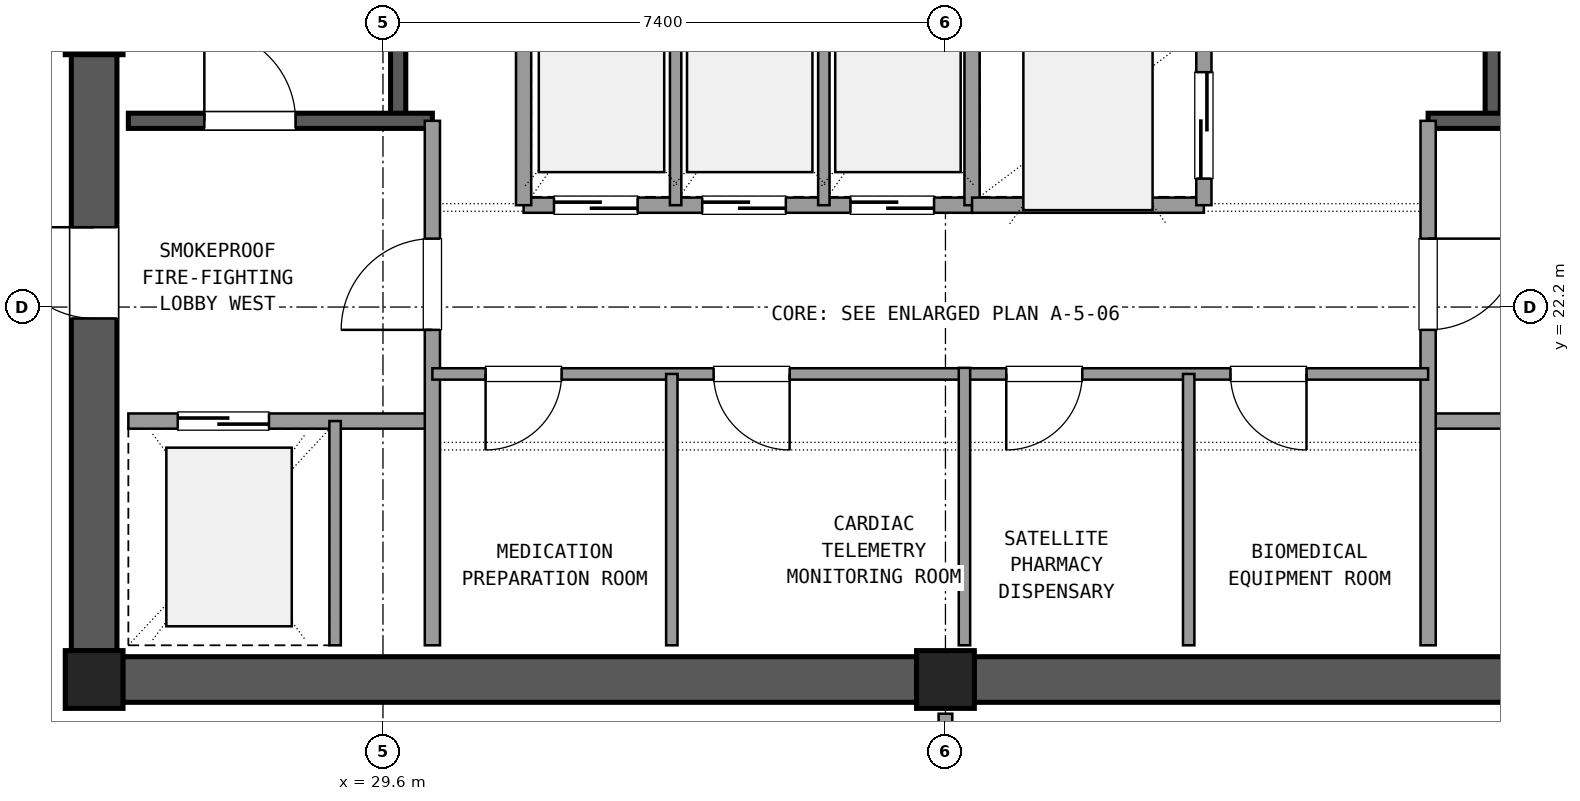
"""IFC4 building model, lengths in metres.
Left out: names, types, materials, properties, quantities, classifications, styles, units other than length and angle.
Written with IfcOpenShell. Run it as: python <this file> out.ifc"""

import sys

from ifc_helpers import new_model, si_unit, direction, frame, frame_2d, origin, origin_2d, place, context, subcontext, project, spatial, rectangle, extrude, element, fill, save


model = new_model("IFC4")
c1 = context("Model", 3, precision=1e-05, world=origin(), true_north=direction((0.0, 1.0)))
c2 = subcontext(c1, "Body", "Model", "MODEL_VIEW")
j1 = project(units=[si_unit("LENGTHUNIT", "METRE"), si_unit("PLANEANGLEUNIT", "RADIAN")], contexts=[c1])
p1 = place(None, origin())
s1 = spatial("IfcSite", under=j1, at=p1, CompositionType="ELEMENT")
p2 = place(p1, origin())
s2 = spatial("IfcBuilding", under=s1, at=p2, CompositionType="ELEMENT")
p3 = place(p2, frame((0.0, 0.0, 264.42)))
s3 = spatial("IfcBuildingStorey", under=s2, at=p3, CompositionType="ELEMENT", Elevation=264.42)
for number, where, z_axis, x_axis in (
    (1, (25.8, 17.3, 0.0), (0.0, 0.0, 1.0), (1.0, 0.0, 0.0)),
    (2, (37.0, 17.3, 0.0), (0.0, 0.0, 1.0), (1.0, 0.0, 0.0)),
    (3, (25.8, 25.9, 0.0), (0.0, 0.0, 1.0), (1.0, 0.0, 0.0)),
):
    element("IfcColumn", number, at=place(p3, frame(where, z_axis=z_axis, x_axis=x_axis)), inside=s3, PredefinedType="COLUMN", context=c2, shape_type="SweptSolid", body=[
        extrude(rectangle(XDim=0.76, YDim=0.76, at=origin_2d()), origin(), (0.0, 0.0, 1.0), 3.6),
    ])
for number, where, z_axis, x_axis in (
    (4, (26.175, 17.3, 0.0), (0.0, 0.0, 1.0), (1.0, 0.0, 0.0)),
    (5, (37.375, 17.3, 0.0), (0.0, 0.0, 1.0), (1.0, 0.0, 0.0)),
):
    element("IfcWall", number, at=place(p3, frame(where, z_axis=z_axis, x_axis=x_axis)), inside=s3, PredefinedType="SHEAR", context=c2, shape_type="SweptSolid", body=[
        extrude(rectangle(XDim=10.45, YDim=0.6, at=frame_2d((5.225, 0.0))), origin(), (0.0, 0.0, 1.0), 3.32),
    ])
p4 = place(p3, frame((25.8, 25.525, 0.0), z_axis=(0.0, 0.0, 1.0), x_axis=(0.0, -1.0, 0.0)))
e6 = element("IfcWall", 6, at=p4, inside=s3, PredefinedType="SHEAR", context=c2, shape_type="SweptSolid", body=[
    extrude(rectangle(XDim=7.85, YDim=0.6, at=frame_2d((3.925, 0.0))), origin(), (0.0, 0.0, 1.0), 3.32),
])
p5 = place(p4, frame((2.275, 0.0, 0.0)))
e7 = element("IfcOpeningElement", 7, at=p5, cuts=e6, PredefinedType="OPENING", context=c2, shape_type="SweptSolid", body=[
    extrude(rectangle(XDim=1.2, YDim=2.15, at=frame_2d((0.6, 1.075))), frame((0.0, 0.31, 0.0), z_axis=(0.0, -1.0, 0.0), x_axis=(1.0, 0.0, 0.0)), (0.0, 0.0, 1.0), 0.62),
])
p6 = place(p3, frame((29.8, 24.65, 0.0), z_axis=(0.0, 0.0, 1.0), x_axis=(0.0, 1.0, 0.0)))
e8 = element("IfcWall", 8, at=p6, inside=s3, PredefinedType="SHEAR", context=c2, shape_type="SweptSolid", body=[
    extrude(rectangle(XDim=9.4, YDim=0.2, at=frame_2d((4.7, 0.0))), origin(), (0.0, 0.0, 1.0), 3.32),
])
p7 = place(p3, frame((26.25, 24.65, 0.0), z_axis=(0.0, 0.0, 1.0), x_axis=(1.0, 0.0, 0.0)))
e9 = element("IfcWall", 9, at=p7, inside=s3, PredefinedType="SHEAR", context=c2, shape_type="SweptSolid", body=[
    extrude(rectangle(XDim=4.0, YDim=0.2, at=frame_2d((2.0, 0.0))), origin(), (0.0, 0.0, 1.0), 3.32),
])
p8 = place(p7, frame((1.0, 0.0, 0.0)))
e10 = element("IfcOpeningElement", 10, at=p8, cuts=e9, PredefinedType="OPENING", context=c2, shape_type="SweptSolid", body=[
    extrude(rectangle(XDim=1.2, YDim=2.15, at=frame_2d((0.6, 1.075))), frame((0.0, 0.11, 0.0), z_axis=(0.0, -1.0, 0.0), x_axis=(1.0, 0.0, 0.0)), (0.0, 0.0, 1.0), 0.22),
])
p9 = place(p3, frame((44.2, 24.65, 0.0), z_axis=(0.0, 0.0, 1.0), x_axis=(0.0, 1.0, 0.0)))
e11 = element("IfcWall", 11, at=p9, inside=s3, PredefinedType="SHEAR", context=c2, shape_type="SweptSolid", body=[
    extrude(rectangle(XDim=9.4, YDim=0.2, at=frame_2d((4.7, 0.0))), origin(), (0.0, 0.0, 1.0), 3.32),
])
p10 = place(p3, frame((43.35, 24.65, 0.0), z_axis=(0.0, 0.0, 1.0), x_axis=(1.0, 0.0, 0.0)))
e12 = element("IfcWall", 12, at=p10, inside=s3, PredefinedType="SHEAR", context=c2, shape_type="SweptSolid", body=[
    extrude(rectangle(XDim=4.4, YDim=0.2, at=frame_2d((2.2, 0.0))), origin(), (0.0, 0.0, 1.0), 3.32),
])
p11 = place(p10, frame((2.0, 0.0, 0.0)))
e13 = element("IfcOpeningElement", 13, at=p11, cuts=e12, PredefinedType="OPENING", context=c2, shape_type="SweptSolid", body=[
    extrude(rectangle(XDim=1.2, YDim=2.15, at=frame_2d((0.6, 1.075))), frame((0.0, 0.11, 0.0), z_axis=(0.0, -1.0, 0.0), x_axis=(1.0, 0.0, 0.0)), (0.0, 0.0, 1.0), 0.22),
])
p12 = place(p3, frame((26.25, 20.7, 0.0), z_axis=(0.0, 0.0, 1.0), x_axis=(1.0, 0.0, 0.0)))
e14 = element("IfcWall", 14, at=p12, inside=s3, PredefinedType="SOLIDWALL", context=c2, shape_type="SweptSolid", body=[
    extrude(rectangle(XDim=4.0, YDim=0.2, at=frame_2d((2.0, 0.0))), origin(), (0.0, 0.0, 1.0), 2.61),
])
p13 = place(p12, frame((0.65, 0.0, 0.0)))
e15 = element("IfcOpeningElement", 15, at=p13, cuts=e14, PredefinedType="OPENING", context=c2, shape_type="SweptSolid", body=[
    extrude(rectangle(XDim=1.2, YDim=2.15, at=frame_2d((0.6, 1.075))), frame((0.0, 0.11, 0.0), z_axis=(0.0, -1.0, 0.0), x_axis=(1.0, 0.0, 0.0)), (0.0, 0.0, 1.0), 0.22),
])
p14 = place(p3, frame((30.25, 17.75, 0.0), z_axis=(0.0, 0.0, 1.0), x_axis=(0.0, 1.0, 0.0)))
e16 = element("IfcWall", 16, at=p14, inside=s3, PredefinedType="SOLIDWALL", context=c2, shape_type="SweptSolid", body=[
    extrude(rectangle(XDim=6.9, YDim=0.2, at=frame_2d((3.45, 0.0))), origin(), (0.0, 0.0, 1.0), 2.61),
])
p15 = place(p14, frame((4.15, 0.0, 0.0)))
e17 = element("IfcOpeningElement", 17, at=p15, cuts=e16, PredefinedType="OPENING", context=c2, shape_type="SweptSolid", body=[
    extrude(rectangle(XDim=1.2, YDim=2.15, at=frame_2d((0.6, 1.075))), frame((0.0, 0.11, 0.0), z_axis=(0.0, -1.0, 0.0), x_axis=(1.0, 0.0, 0.0)), (0.0, 0.0, 1.0), 0.22),
])
p16 = place(p3, frame((28.97, 17.75, 0.0), z_axis=(0.0, 0.0, 1.0), x_axis=(0.0, 1.0, 0.0)))
e18 = element("IfcWall", 18, at=p16, inside=s3, PredefinedType="PARTITIONING", context=c2, shape_type="SweptSolid", body=[
    extrude(rectangle(XDim=2.95, YDim=0.15, at=frame_2d((1.475, 0.0))), origin(), (0.0, 0.0, 1.0), 2.61),
])
p17 = place(p3, frame((43.35, 20.7, 0.0), z_axis=(0.0, 0.0, 1.0), x_axis=(1.0, 0.0, 0.0)))
e19 = element("IfcWall", 19, at=p17, inside=s3, PredefinedType="SOLIDWALL", context=c2, shape_type="SweptSolid", body=[
    extrude(rectangle(XDim=4.4, YDim=0.2, at=frame_2d((2.2, 0.0))), origin(), (0.0, 0.0, 1.0), 2.61),
])
p18 = place(p17, frame((2.35, 0.0, 0.0)))
e20 = element("IfcOpeningElement", 20, at=p18, cuts=e19, PredefinedType="OPENING", context=c2, shape_type="SweptSolid", body=[
    extrude(rectangle(XDim=1.2, YDim=2.15, at=frame_2d((0.6, 1.075))), frame((0.0, 0.11, 0.0), z_axis=(0.0, -1.0, 0.0), x_axis=(1.0, 0.0, 0.0)), (0.0, 0.0, 1.0), 0.22),
])
p19 = place(p3, frame((43.35, 17.75, 0.0), z_axis=(0.0, 0.0, 1.0), x_axis=(0.0, 1.0, 0.0)))
e21 = element("IfcWall", 21, at=p19, inside=s3, PredefinedType="SOLIDWALL", context=c2, shape_type="SweptSolid", body=[
    extrude(rectangle(XDim=6.9, YDim=0.2, at=frame_2d((3.45, 0.0))), origin(), (0.0, 0.0, 1.0), 2.61),
])
p20 = place(p19, frame((4.15, 0.0, 0.0)))
e22 = element("IfcOpeningElement", 22, at=p20, cuts=e21, PredefinedType="OPENING", context=c2, shape_type="SweptSolid", body=[
    extrude(rectangle(XDim=1.2, YDim=2.15, at=frame_2d((0.6, 1.075))), frame((0.0, 0.11, 0.0), z_axis=(0.0, -1.0, 0.0), x_axis=(1.0, 0.0, 0.0)), (0.0, 0.0, 1.0), 0.22),
])
p21 = place(p3, frame((30.25, 21.32, 0.0), z_axis=(0.0, 0.0, 1.0), x_axis=(1.0, 0.0, 0.0)))
e23 = element("IfcWall", 23, at=p21, inside=s3, PredefinedType="PARTITIONING", context=c2, shape_type="SweptSolid", body=[
    extrude(rectangle(XDim=7.0, YDim=0.15, at=frame_2d((3.5, 0.0))), origin(), (0.0, 0.0, 1.0), 2.61),
])
p22 = place(p21, frame((0.7, 0.0, 0.0)))
e24 = element("IfcOpeningElement", 24, at=p22, cuts=e23, PredefinedType="OPENING", context=c2, shape_type="SweptSolid", body=[
    extrude(rectangle(XDim=1.0, YDim=2.15, at=frame_2d((0.5, 1.075))), frame((0.0, 0.085, 0.0), z_axis=(0.0, -1.0, 0.0), x_axis=(1.0, 0.0, 0.0)), (0.0, 0.0, 1.0), 0.17),
])
p23 = place(p21, frame((3.7, 0.0, 0.0)))
e25 = element("IfcOpeningElement", 25, at=p23, cuts=e23, PredefinedType="OPENING", context=c2, shape_type="SweptSolid", body=[
    extrude(rectangle(XDim=1.0, YDim=2.15, at=frame_2d((0.5, 1.075))), frame((0.0, 0.085, 0.0), z_axis=(0.0, -1.0, 0.0), x_axis=(1.0, 0.0, 0.0)), (0.0, 0.0, 1.0), 0.17),
])
p24 = place(p3, frame((33.4, 17.75, 0.0), z_axis=(0.0, 0.0, 1.0), x_axis=(0.0, 1.0, 0.0)))
e26 = element("IfcWall", 26, at=p24, inside=s3, PredefinedType="PARTITIONING", context=c2, shape_type="SweptSolid", body=[
    extrude(rectangle(XDim=3.57, YDim=0.15, at=frame_2d((1.785, 0.0))), origin(), (0.0, 0.0, 1.0), 2.61),
])
p25 = place(p3, frame((37.25, 21.32, 0.0), z_axis=(0.0, 0.0, 1.0), x_axis=(1.0, 0.0, 0.0)))
e27 = element("IfcWall", 27, at=p25, inside=s3, PredefinedType="PARTITIONING", context=c2, shape_type="SweptSolid", body=[
    extrude(rectangle(XDim=6.1, YDim=0.15, at=frame_2d((3.05, 0.0))), origin(), (0.0, 0.0, 1.0), 2.61),
])
p26 = place(p25, frame((0.55, 0.0, 0.0)))
e28 = element("IfcOpeningElement", 28, at=p26, cuts=e27, PredefinedType="OPENING", context=c2, shape_type="SweptSolid", body=[
    extrude(rectangle(XDim=1.0, YDim=2.15, at=frame_2d((0.5, 1.075))), frame((0.0, 0.085, 0.0), z_axis=(0.0, -1.0, 0.0), x_axis=(1.0, 0.0, 0.0)), (0.0, 0.0, 1.0), 0.17),
])
p27 = place(p25, frame((3.5, 0.0, 0.0)))
e29 = element("IfcOpeningElement", 29, at=p27, cuts=e27, PredefinedType="OPENING", context=c2, shape_type="SweptSolid", body=[
    extrude(rectangle(XDim=1.0, YDim=2.15, at=frame_2d((0.5, 1.075))), frame((0.0, 0.085, 0.0), z_axis=(0.0, -1.0, 0.0), x_axis=(1.0, 0.0, 0.0)), (0.0, 0.0, 1.0), 0.17),
])
p28 = place(p3, frame((40.2, 17.75, 0.0), z_axis=(0.0, 0.0, 1.0), x_axis=(0.0, 1.0, 0.0)))
e30 = element("IfcWall", 30, at=p28, inside=s3, PredefinedType="PARTITIONING", context=c2, shape_type="SweptSolid", body=[
    extrude(rectangle(XDim=3.57, YDim=0.15, at=frame_2d((1.785, 0.0))), origin(), (0.0, 0.0, 1.0), 2.61),
])
p29 = place(p3, frame((37.25, 17.75, 0.0), z_axis=(0.0, 0.0, 1.0), x_axis=(0.0, 1.0, 0.0)))
e31 = element("IfcWall", 31, at=p29, inside=s3, PredefinedType="PARTITIONING", context=c2, shape_type="SweptSolid", body=[
    extrude(rectangle(XDim=3.65, YDim=0.15, at=frame_2d((1.825, 0.0))), origin(), (0.0, 0.0, 1.0), 2.61),
])
p30 = place(p3, frame((31.45, 23.54, 0.0), z_axis=(0.0, 0.0, 1.0), x_axis=(1.0, 0.0, 0.0)))
e32 = element("IfcWall", 32, at=p30, inside=s3, PredefinedType="SOLIDWALL", context=c2, shape_type="SweptSolid", body=[
    extrude(rectangle(XDim=5.9, YDim=0.2, at=frame_2d((2.95, 0.0))), origin(), (0.0, 0.0, 1.0), 2.61),
])
p31 = place(p30, frame((0.4, 0.0, 0.0)))
e33 = element("IfcOpeningElement", 33, at=p31, cuts=e32, PredefinedType="OPENING", context=c2, shape_type="SweptSolid", body=[
    extrude(rectangle(XDim=1.1, YDim=2.15, at=frame_2d((0.55, 1.075))), frame((0.0, 0.11, 0.0), z_axis=(0.0, -1.0, 0.0), x_axis=(1.0, 0.0, 0.0)), (0.0, 0.0, 1.0), 0.22),
])
p32 = place(p30, frame((2.35, 0.0, 0.0)))
e34 = element("IfcOpeningElement", 34, at=p32, cuts=e32, PredefinedType="OPENING", context=c2, shape_type="SweptSolid", body=[
    extrude(rectangle(XDim=1.1, YDim=2.15, at=frame_2d((0.55, 1.075))), frame((0.0, 0.11, 0.0), z_axis=(0.0, -1.0, 0.0), x_axis=(1.0, 0.0, 0.0)), (0.0, 0.0, 1.0), 0.22),
])
p33 = place(p30, frame((4.3, 0.0, 0.0)))
e35 = element("IfcOpeningElement", 35, at=p33, cuts=e32, PredefinedType="OPENING", context=c2, shape_type="SweptSolid", body=[
    extrude(rectangle(XDim=1.1, YDim=2.15, at=frame_2d((0.55, 1.075))), frame((0.0, 0.11, 0.0), z_axis=(0.0, -1.0, 0.0), x_axis=(1.0, 0.0, 0.0)), (0.0, 0.0, 1.0), 0.22),
])
p34 = place(p3, frame((31.45, 23.54, 0.0), z_axis=(0.0, 0.0, 1.0), x_axis=(0.0, 1.0, 0.0)))
e36 = element("IfcWall", 36, at=p34, inside=s3, PredefinedType="SOLIDWALL", context=c2, shape_type="SweptSolid", body=[
    extrude(rectangle(XDim=2.81, YDim=0.2, at=frame_2d((1.405, 0.0))), origin(), (0.0, 0.0, 1.0), 2.61),
])
for number, where, z_axis, x_axis in (
    (37, (33.45, 23.54, 0.0), (0.0, 0.0, 1.0), (0.0, 1.0, 0.0)),
    (38, (35.4, 23.54, 0.0), (0.0, 0.0, 1.0), (0.0, 1.0, 0.0)),
):
    element("IfcWall", number, at=place(p3, frame(where, z_axis=z_axis, x_axis=x_axis)), inside=s3, PredefinedType="PARTITIONING", context=c2, shape_type="SweptSolid", body=[
        extrude(rectangle(XDim=2.81, YDim=0.15, at=frame_2d((1.405, 0.0))), origin(), (0.0, 0.0, 1.0), 2.61),
    ])
p35 = place(p3, frame((37.35, 23.54, 0.0), z_axis=(0.0, 0.0, 1.0), x_axis=(0.0, 1.0, 0.0)))
e39 = element("IfcWall", 39, at=p35, inside=s3, PredefinedType="SOLIDWALL", context=c2, shape_type="SweptSolid", body=[
    extrude(rectangle(XDim=6.82, YDim=0.2, at=frame_2d((3.41, 0.0))), origin(), (0.0, 0.0, 1.0), 2.61),
])
p36 = place(p3, frame((37.35, 23.54, 0.0), z_axis=(0.0, 0.0, 1.0), x_axis=(1.0, 0.0, 0.0)))
e40 = element("IfcWall", 40, at=p36, inside=s3, PredefinedType="SOLIDWALL", context=c2, shape_type="SweptSolid", body=[
    extrude(rectangle(XDim=3.05, YDim=0.2, at=frame_2d((1.525, 0.0))), origin(), (0.0, 0.0, 1.0), 2.61),
])
p37 = place(p3, frame((40.4, 23.54, 0.0), z_axis=(0.0, 0.0, 1.0), x_axis=(0.0, 1.0, 0.0)))
e41 = element("IfcWall", 41, at=p37, inside=s3, PredefinedType="SOLIDWALL", context=c2, shape_type="SweptSolid", body=[
    extrude(rectangle(XDim=6.82, YDim=0.2, at=frame_2d((3.41, 0.0))), origin(), (0.0, 0.0, 1.0), 2.61),
])
p38 = place(p37, frame((0.35, 0.0, 0.0)))
e42 = element("IfcOpeningElement", 42, at=p38, cuts=e41, PredefinedType="OPENING", context=c2, shape_type="SweptSolid", body=[
    extrude(rectangle(XDim=1.4, YDim=2.2, at=frame_2d((0.7, 1.1))), frame((0.0, 0.11, 0.0), z_axis=(0.0, -1.0, 0.0), x_axis=(1.0, 0.0, 0.0)), (0.0, 0.0, 1.0), 0.22),
])
p39 = place(p37, frame((2.65, 0.0, 0.0)))
e43 = element("IfcOpeningElement", 43, at=p39, cuts=e41, PredefinedType="OPENING", context=c2, shape_type="SweptSolid", body=[
    extrude(rectangle(XDim=1.4, YDim=2.2, at=frame_2d((0.7, 1.1))), frame((0.0, 0.11, 0.0), z_axis=(0.0, -1.0, 0.0), x_axis=(1.0, 0.0, 0.0)), (0.0, 0.0, 1.0), 0.22),
])
p40 = place(p37, frame((4.85, 0.0, 0.0)))
e44 = element("IfcOpeningElement", 44, at=p40, cuts=e41, PredefinedType="OPENING", context=c2, shape_type="SweptSolid", body=[
    extrude(rectangle(XDim=1.4, YDim=2.2, at=frame_2d((0.7, 1.1))), frame((0.0, 0.11, 0.0), z_axis=(0.0, -1.0, 0.0), x_axis=(1.0, 0.0, 0.0)), (0.0, 0.0, 1.0), 0.22),
])
p41 = place(p3, frame((37.0, 14.15, 0.0), z_axis=(0.0, 0.0, 1.0), x_axis=(0.0, 1.0, 0.0)))
e45 = element("IfcWall", 45, at=p41, inside=s3, PredefinedType="PARTITIONING", context=c2, shape_type="SweptSolid", body=[
    extrude(rectangle(XDim=2.7, YDim=0.18, at=frame_2d((1.35, 0.0))), origin(), (0.0, 0.0, 1.0), 2.61),
])
p42 = place(p41, frame((0.35, 0.0, 0.0)))
e46 = element("IfcOpeningElement", 46, at=p42, cuts=e45, PredefinedType="OPENING", context=c2, shape_type="SweptSolid", body=[
    extrude(rectangle(XDim=2.0, YDim=2.2, at=frame_2d((1.0, 1.1))), frame((0.0, 0.1, 0.0), z_axis=(0.0, -1.0, 0.0), x_axis=(1.0, 0.0, 0.0)), (0.0, 0.0, 1.0), 0.2),
])
p43 = place(p8, origin())
e47 = element("IfcDoor", 47, at=p43, inside=s3, OperationType="SINGLE_SWING_LEFT", PredefinedType="DOOR", context=c2, shape_type="SweptSolid", body=[
    extrude(rectangle(XDim=1.2, YDim=2.15, at=frame_2d((0.6, 1.075))), frame((0.0, 0.025, 0.0), z_axis=(0.0, -1.0, 0.0), x_axis=(1.0, 0.0, 0.0)), (0.0, 0.0, 1.0), 0.05),
])
fill(e10, e47)
p44 = place(p13, origin())
e48 = element("IfcDoor", 48, at=p44, inside=s3, OperationType="SLIDING_TO_LEFT", PredefinedType="DOOR", context=c2, shape_type="SweptSolid", body=[
    extrude(rectangle(XDim=1.2, YDim=2.15, at=frame_2d((0.6, 1.075))), frame((0.0, 0.025, 0.0), z_axis=(0.0, -1.0, 0.0), x_axis=(1.0, 0.0, 0.0)), (0.0, 0.0, 1.0), 0.05),
])
fill(e15, e48)
p45 = place(p15, origin())
e49 = element("IfcDoor", 49, at=p45, inside=s3, OperationType="SINGLE_SWING_LEFT", PredefinedType="DOOR", context=c2, shape_type="SweptSolid", body=[
    extrude(rectangle(XDim=1.2, YDim=2.15, at=frame_2d((0.6, 1.075))), frame((0.0, 0.025, 0.0), z_axis=(0.0, -1.0, 0.0), x_axis=(1.0, 0.0, 0.0)), (0.0, 0.0, 1.0), 0.05),
])
fill(e17, e49)
p46 = place(p20, frame((1.2, 0.0, 0.0), z_axis=(0.0, 0.0, 1.0), x_axis=(-1.0, 0.0, 0.0)))
e50 = element("IfcDoor", 50, at=p46, inside=s3, OperationType="SINGLE_SWING_RIGHT", PredefinedType="DOOR", context=c2, shape_type="SweptSolid", body=[
    extrude(rectangle(XDim=1.2, YDim=2.15, at=frame_2d((0.6, 1.075))), frame((0.0, 0.025, 0.0), z_axis=(0.0, -1.0, 0.0), x_axis=(1.0, 0.0, 0.0)), (0.0, 0.0, 1.0), 0.05),
])
fill(e22, e50)
p47 = place(p5, frame((1.2, 0.0, 0.0), z_axis=(0.0, 0.0, 1.0), x_axis=(-1.0, 0.0, 0.0)))
e51 = element("IfcDoor", 51, at=p47, inside=s3, OperationType="SINGLE_SWING_LEFT", PredefinedType="DOOR", context=c2, shape_type="SweptSolid", body=[
    extrude(rectangle(XDim=1.2, YDim=2.15, at=frame_2d((0.6, 1.075))), frame((0.0, 0.025, 0.0), z_axis=(0.0, -1.0, 0.0), x_axis=(1.0, 0.0, 0.0)), (0.0, 0.0, 1.0), 0.05),
])
fill(e7, e51)
p48 = place(p22, frame((1.0, 0.0, 0.0), z_axis=(0.0, 0.0, 1.0), x_axis=(-1.0, 0.0, 0.0)))
e52 = element("IfcDoor", 52, at=p48, inside=s3, OperationType="SINGLE_SWING_LEFT", PredefinedType="DOOR", context=c2, shape_type="SweptSolid", body=[
    extrude(rectangle(XDim=1.0, YDim=2.15, at=frame_2d((0.5, 1.075))), frame((0.0, 0.025, 0.0), z_axis=(0.0, -1.0, 0.0), x_axis=(1.0, 0.0, 0.0)), (0.0, 0.0, 1.0), 0.05),
])
fill(e24, e52)
p49 = place(p23, frame((1.0, 0.0, 0.0), z_axis=(0.0, 0.0, 1.0), x_axis=(-1.0, 0.0, 0.0)))
e53 = element("IfcDoor", 53, at=p49, inside=s3, OperationType="SINGLE_SWING_RIGHT", PredefinedType="DOOR", context=c2, shape_type="SweptSolid", body=[
    extrude(rectangle(XDim=1.0, YDim=2.15, at=frame_2d((0.5, 1.075))), frame((0.0, 0.025, 0.0), z_axis=(0.0, -1.0, 0.0), x_axis=(1.0, 0.0, 0.0)), (0.0, 0.0, 1.0), 0.05),
])
fill(e25, e53)
p50 = place(p26, frame((1.0, 0.0, 0.0), z_axis=(0.0, 0.0, 1.0), x_axis=(-1.0, 0.0, 0.0)))
e54 = element("IfcDoor", 54, at=p50, inside=s3, OperationType="SINGLE_SWING_LEFT", PredefinedType="DOOR", context=c2, shape_type="SweptSolid", body=[
    extrude(rectangle(XDim=1.0, YDim=2.15, at=frame_2d((0.5, 1.075))), frame((0.0, 0.025, 0.0), z_axis=(0.0, -1.0, 0.0), x_axis=(1.0, 0.0, 0.0)), (0.0, 0.0, 1.0), 0.05),
])
fill(e28, e54)
p51 = place(p27, frame((1.0, 0.0, 0.0), z_axis=(0.0, 0.0, 1.0), x_axis=(-1.0, 0.0, 0.0)))
e55 = element("IfcDoor", 55, at=p51, inside=s3, OperationType="SINGLE_SWING_RIGHT", PredefinedType="DOOR", context=c2, shape_type="SweptSolid", body=[
    extrude(rectangle(XDim=1.0, YDim=2.15, at=frame_2d((0.5, 1.075))), frame((0.0, 0.025, 0.0), z_axis=(0.0, -1.0, 0.0), x_axis=(1.0, 0.0, 0.0)), (0.0, 0.0, 1.0), 0.05),
])
fill(e29, e55)
p52 = place(p31, origin())
e56 = element("IfcDoor", 56, at=p52, inside=s3, OperationType="SLIDING_TO_RIGHT", PredefinedType="DOOR", context=c2, shape_type="SweptSolid", body=[
    extrude(rectangle(XDim=1.1, YDim=2.15, at=frame_2d((0.55, 1.075))), frame((0.0, 0.025, 0.0), z_axis=(0.0, -1.0, 0.0), x_axis=(1.0, 0.0, 0.0)), (0.0, 0.0, 1.0), 0.05),
])
fill(e33, e56)
p53 = place(p32, origin())
e57 = element("IfcDoor", 57, at=p53, inside=s3, OperationType="SLIDING_TO_RIGHT", PredefinedType="DOOR", context=c2, shape_type="SweptSolid", body=[
    extrude(rectangle(XDim=1.1, YDim=2.15, at=frame_2d((0.55, 1.075))), frame((0.0, 0.025, 0.0), z_axis=(0.0, -1.0, 0.0), x_axis=(1.0, 0.0, 0.0)), (0.0, 0.0, 1.0), 0.05),
])
fill(e34, e57)
p54 = place(p33, origin())
e58 = element("IfcDoor", 58, at=p54, inside=s3, OperationType="SLIDING_TO_RIGHT", PredefinedType="DOOR", context=c2, shape_type="SweptSolid", body=[
    extrude(rectangle(XDim=1.1, YDim=2.15, at=frame_2d((0.55, 1.075))), frame((0.0, 0.025, 0.0), z_axis=(0.0, -1.0, 0.0), x_axis=(1.0, 0.0, 0.0)), (0.0, 0.0, 1.0), 0.05),
])
fill(e35, e58)
p55 = place(p38, origin())
e59 = element("IfcDoor", 59, at=p55, inside=s3, OperationType="SLIDING_TO_LEFT", PredefinedType="DOOR", context=c2, shape_type="SweptSolid", body=[
    extrude(rectangle(XDim=1.4, YDim=2.2, at=frame_2d((0.7, 1.1))), frame((0.0, 0.025, 0.0), z_axis=(0.0, -1.0, 0.0), x_axis=(1.0, 0.0, 0.0)), (0.0, 0.0, 1.0), 0.05),
])
fill(e42, e59)
save(model, sys.argv[1])
